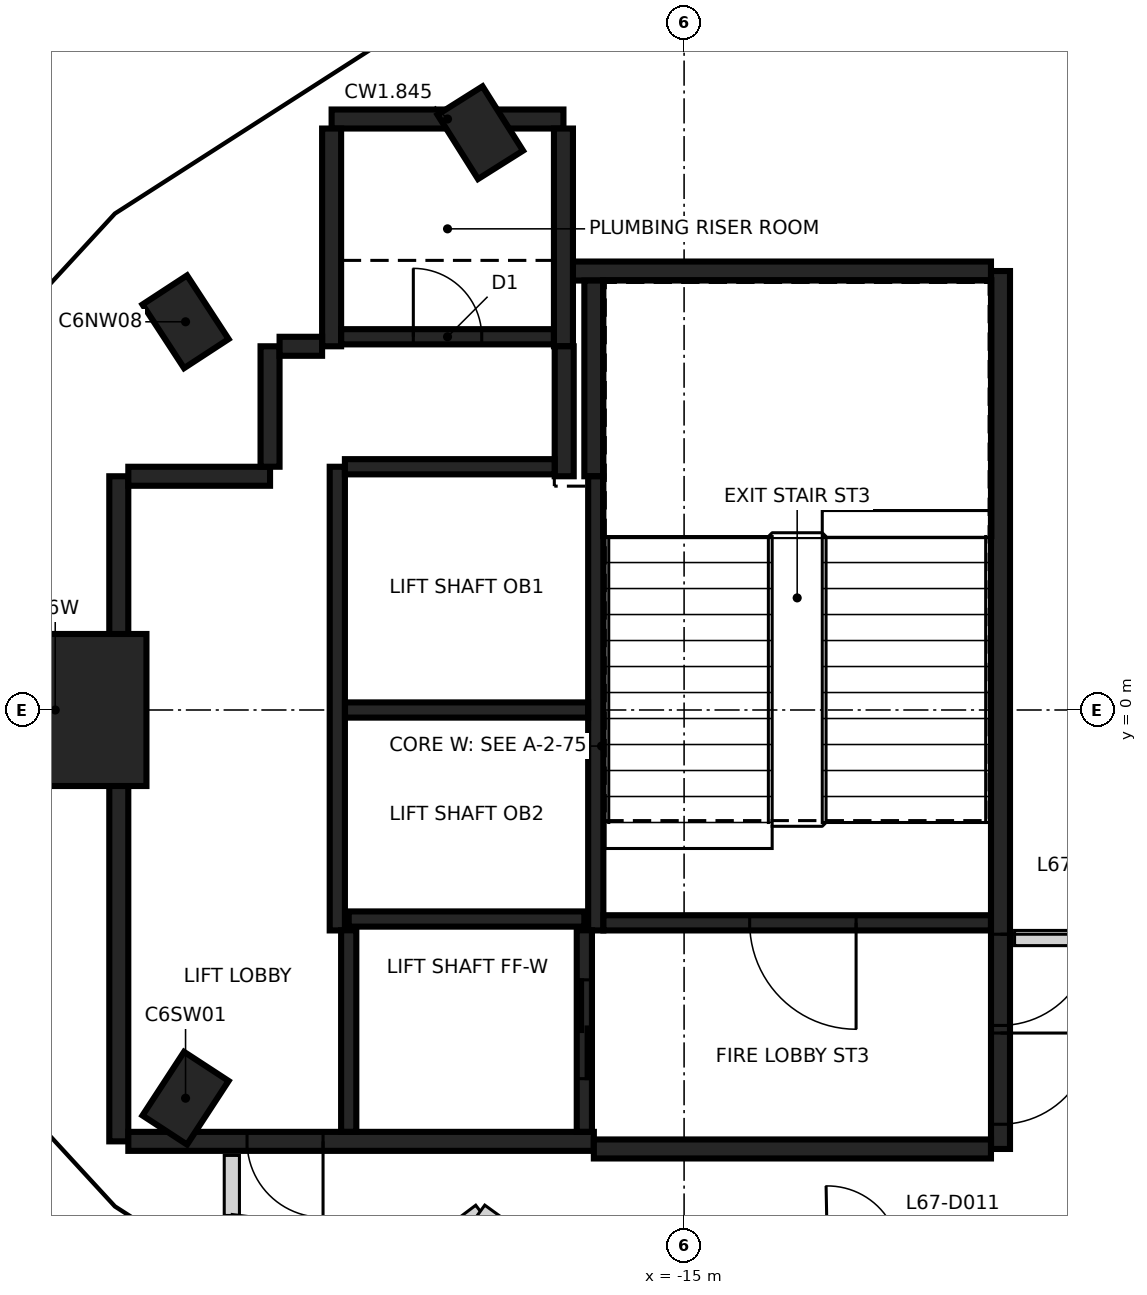
"""IFC4 building model, lengths in metres.
Left out: names, types, materials, properties, quantities, classifications, styles, units other than length and angle.
Written with IfcOpenShell. Run it as: python <this file> out.ifc"""

import sys

from ifc_helpers import new_model, si_unit, direction, frame, frame_2d, origin, origin_2d, place, context, subcontext, project, spatial, rectangle, extrude, element, fill, save


model = new_model("IFC4")
c1 = context("Model", 3, precision=1e-05, world=origin(), true_north=direction((0.0, 1.0)))
c2 = subcontext(c1, "Body", "Model", "MODEL_VIEW")
j1 = project(units=[si_unit("LENGTHUNIT", "METRE"), si_unit("PLANEANGLEUNIT", "RADIAN")], contexts=[c1])
p1 = place(None, origin())
s1 = spatial("IfcSite", under=j1, at=p1, CompositionType="ELEMENT")
p2 = place(p1, origin())
s2 = spatial("IfcBuilding", under=s1, at=p2, CompositionType="ELEMENT")
p3 = place(p2, frame((0.0, 0.0, 265.8)))
s3 = spatial("IfcBuildingStorey", under=s2, at=p3, CompositionType="ELEMENT", Elevation=265.8)
for number, where, z_axis, x_axis in (
    (1, (-17.681, 7.595, -0.35), (0.0, 0.0, 1.0), (-0.533, 0.846, 0.0)),
    (2, (-21.559, 5.107, -0.35), (0.0, 0.0, 1.0), (-0.547, 0.837, 0.0)),
    (3, (-21.559, -5.107, -0.35), (0.0, 0.0, 1.0), (0.547, 0.837, 0.0)),
):
    element("IfcColumn", number, at=place(p3, frame(where, z_axis=z_axis, x_axis=x_axis)), inside=s3, PredefinedType="COLUMN", context=c2, shape_type="SweptSolid", body=[
        extrude(rectangle(XDim=1.0, YDim=0.7, at=origin_2d()), origin(), (0.0, 0.0, 1.0), 3.6),
    ])
p4 = place(p3, frame((-23.273, 0.0, -0.35), z_axis=(0.0, 0.0, 1.0), x_axis=(1.0, 0.0, 0.0)))
e4 = element("IfcColumn", 4, at=p4, inside=s3, PredefinedType="COLUMN", context=c2, shape_type="SweptSolid", body=[
    extrude(rectangle(XDim=2.4, YDim=2.0, at=origin_2d()), origin(), (0.0, 0.0, 1.0), 3.6),
])
p5 = place(p3, frame((-10.837, 5.775, 0.0), z_axis=(0.0, 0.0, 1.0), x_axis=(0.0, -1.0, 0.0)))
e5 = element("IfcWall", 5, at=p5, inside=s3, PredefinedType="SHEAR", context=c2, shape_type="SweptSolid", body=[
    extrude(rectangle(XDim=11.55, YDim=0.25, at=frame_2d((5.775, 0.0))), origin(), (0.0, 0.0, 1.0), 3.25),
])
p6 = place(p5, frame((10.025, 0.0, 0.0)))
e6 = element("IfcOpeningElement", 6, at=p6, cuts=e5, PredefinedType="OPENING", context=c2, shape_type="SweptSolid", body=[
    extrude(rectangle(XDim=1.2, YDim=2.1, at=frame_2d((0.6, 1.05))), frame((0.0, 0.135, 0.0), z_axis=(0.0, -1.0, 0.0), x_axis=(1.0, 0.0, 0.0)), (0.0, 0.0, 1.0), 0.27),
])
p7 = place(p5, frame((8.725, 0.0, 0.0)))
e7 = element("IfcOpeningElement", 7, at=p7, cuts=e5, PredefinedType="OPENING", context=c2, shape_type="SweptSolid", body=[
    extrude(rectangle(XDim=1.2, YDim=2.1, at=frame_2d((0.6, 1.05))), frame((0.0, 0.135, 0.0), z_axis=(0.0, -1.0, 0.0), x_axis=(1.0, 0.0, 0.0)), (0.0, 0.0, 1.0), 0.27),
])
p8 = place(p3, frame((-22.437, -5.675, 0.0), z_axis=(0.0, 0.0, 1.0), x_axis=(0.0, 1.0, 0.0)))
e8 = element("IfcWall", 8, at=p8, inside=s3, PredefinedType="SHEAR", context=c2, shape_type="SweptSolid", body=[
    extrude(rectangle(XDim=8.75, YDim=0.25, at=frame_2d((4.375, 0.0))), origin(), (0.0, 0.0, 1.0), 3.25),
])
p9 = place(p3, frame((-16.187, -5.675, 0.0), z_axis=(0.0, 0.0, 1.0), x_axis=(-1.0, 0.0, 0.0)))
e9 = element("IfcWall", 9, at=p9, inside=s3, PredefinedType="SHEAR", context=c2, shape_type="SweptSolid", body=[
    extrude(rectangle(XDim=6.125, YDim=0.25, at=frame_2d((3.062, 0.0))), origin(), (0.0, 0.0, 1.0), 3.25),
])
p10 = place(p9, frame((3.563, 0.0, 0.0)))
e10 = element("IfcOpeningElement", 10, at=p10, cuts=e9, PredefinedType="OPENING", context=c2, shape_type="SweptSolid", body=[
    extrude(rectangle(XDim=1.0, YDim=2.1, at=frame_2d((0.5, 1.05))), frame((0.0, 0.135, 0.0), z_axis=(0.0, -1.0, 0.0), x_axis=(1.0, 0.0, 0.0)), (0.0, 0.0, 1.0), 0.27),
])
p11 = place(p3, frame((-10.963, -5.775, 0.0), z_axis=(0.0, 0.0, 1.0), x_axis=(-1.0, 0.0, 0.0)))
e11 = element("IfcWall", 11, at=p11, inside=s3, PredefinedType="SHEAR", context=c2, shape_type="SweptSolid", body=[
    extrude(rectangle(XDim=5.225, YDim=0.25, at=frame_2d((2.612, 0.0))), origin(), (0.0, 0.0, 1.0), 3.25),
])
p12 = place(p3, frame((-16.472, 5.775, 0.0), z_axis=(0.0, 0.0, 1.0), x_axis=(1.0, 0.0, 0.0)))
e12 = element("IfcWall", 12, at=p12, inside=s3, PredefinedType="SHEAR", context=c2, shape_type="SweptSolid", body=[
    extrude(rectangle(XDim=5.51, YDim=0.25, at=frame_2d((2.755, 0.0))), origin(), (0.0, 0.0, 1.0), 3.25),
])
p13 = place(p3, frame((-19.637, 7.775, 0.0), z_axis=(0.0, 0.0, 1.0), x_axis=(1.0, 0.0, 0.0)))
e13 = element("IfcWall", 13, at=p13, inside=s3, PredefinedType="SHEAR", context=c2, shape_type="SweptSolid", body=[
    extrude(rectangle(XDim=3.05, YDim=0.25, at=frame_2d((1.525, 0.0))), origin(), (0.0, 0.0, 1.0), 3.25),
])
for number, where, z_axis, x_axis in (
    (14, (-16.587, 7.65, 0.0), (0.0, 0.0, 1.0), (0.0, -1.0, 0.0)),
    (15, (-19.637, 4.785, 0.0), (0.0, 0.0, 1.0), (0.0, 1.0, 0.0)),
):
    element("IfcWall", number, at=place(p3, frame(where, z_axis=z_axis, x_axis=x_axis)), inside=s3, PredefinedType="SHEAR", context=c2, shape_type="SweptSolid", body=[
        extrude(rectangle(XDim=2.865, YDim=0.25, at=frame_2d((1.432, 0.0))), origin(), (0.0, 0.0, 1.0), 3.25),
    ])
p14 = place(p3, frame((-16.187, 3.075, 0.0), z_axis=(0.0, 0.0, 1.0), x_axis=(0.0, 1.0, 0.0)))
e16 = element("IfcWall", 16, at=p14, inside=s3, PredefinedType="SHEAR", context=c2, shape_type="SweptSolid", body=[
    extrude(rectangle(XDim=2.575, YDim=0.25, at=frame_2d((1.287, 0.0))), origin(), (0.0, 0.0, 1.0), 3.25),
])
p15 = place(p3, frame((-22.312, 3.075, 0.0), z_axis=(0.0, 0.0, 1.0), x_axis=(1.0, 0.0, 0.0)))
e17 = element("IfcWall", 17, at=p15, inside=s3, PredefinedType="SHEAR", context=c2, shape_type="SweptSolid", body=[
    extrude(rectangle(XDim=1.865, YDim=0.25, at=frame_2d((0.932, 0.0))), origin(), (0.0, 0.0, 1.0), 3.25),
])
p16 = place(p3, frame((-16.577, 4.785, 0.0), z_axis=(0.0, 0.0, 1.0), x_axis=(0.0, -1.0, 0.0)))
e18 = element("IfcWall", 18, at=p16, inside=s3, PredefinedType="SHEAR", context=c2, shape_type="SweptSolid", body=[
    extrude(rectangle(XDim=1.71, YDim=0.25, at=frame_2d((0.855, 0.0))), origin(), (0.0, 0.0, 1.0), 3.25),
])
p17 = place(p3, frame((-20.447, 3.2, 0.0), z_axis=(0.0, 0.0, 1.0), x_axis=(0.0, 1.0, 0.0)))
e19 = element("IfcWall", 19, at=p17, inside=s3, PredefinedType="SHEAR", context=c2, shape_type="SweptSolid", body=[
    extrude(rectangle(XDim=1.584, YDim=0.25, at=frame_2d((0.792, 0.0))), origin(), (0.0, 0.0, 1.0), 3.25),
])
p18 = place(p3, frame((-20.322, 4.785, 0.0), z_axis=(0.0, 0.0, 1.0), x_axis=(1.0, 0.0, 0.0)))
e20 = element("IfcWall", 20, at=p18, inside=s3, PredefinedType="SHEAR", context=c2, shape_type="SweptSolid", body=[
    extrude(rectangle(XDim=0.559, YDim=0.25, at=frame_2d((0.28, 0.0))), origin(), (0.0, 0.0, 1.0), 3.25),
])
p19 = place(p3, frame((-16.162, 3.074, 0.0), z_axis=(0.0, 0.0, 1.0), x_axis=(0.0, -1.0, 0.0)))
e21 = element("IfcWall", 21, at=p19, inside=s3, PredefinedType="SHEAR", context=c2, shape_type="SweptSolid", body=[
    extrude(rectangle(XDim=5.974, YDim=0.2, at=frame_2d((2.987, 0.0))), origin(), (0.0, 0.0, 1.0), 3.25),
])
p20 = place(p3, frame((-19.562, -2.9, 0.0), z_axis=(0.0, 0.0, 1.0), x_axis=(0.0, 1.0, 0.0)))
e22 = element("IfcWall", 22, at=p20, inside=s3, PredefinedType="SHEAR", context=c2, shape_type="SweptSolid", body=[
    extrude(rectangle(XDim=6.1, YDim=0.2, at=frame_2d((3.05, 0.0))), origin(), (0.0, 0.0, 1.0), 3.25),
])
p21 = place(p3, frame((-10.963, -2.8, 0.0), z_axis=(0.0, 0.0, 1.0), x_axis=(-1.0, 0.0, 0.0)))
e23 = element("IfcWall", 23, at=p21, inside=s3, PredefinedType="SHEAR", context=c2, shape_type="SweptSolid", body=[
    extrude(rectangle(XDim=5.098, YDim=0.2, at=frame_2d((2.549, 0.0))), origin(), (0.0, 0.0, 1.0), 3.25),
])
p22 = place(p21, frame((1.774, 0.0, 0.0)))
e24 = element("IfcOpeningElement", 24, at=p22, cuts=e23, PredefinedType="OPENING", context=c2, shape_type="SweptSolid", body=[
    extrude(rectangle(XDim=1.4, YDim=2.1, at=frame_2d((0.7, 1.05))), frame((0.0, 0.11, 0.0), z_axis=(0.0, -1.0, 0.0), x_axis=(1.0, 0.0, 0.0)), (0.0, 0.0, 1.0), 0.22),
])
p23 = place(p3, frame((-16.263, 0.0, 0.0), z_axis=(0.0, 0.0, 1.0), x_axis=(-1.0, 0.0, 0.0)))
e25 = element("IfcWall", 25, at=p23, inside=s3, PredefinedType="SHEAR", context=c2, shape_type="SweptSolid", body=[
    extrude(rectangle(XDim=3.198, YDim=0.2, at=frame_2d((1.599, 0.0))), origin(), (0.0, 0.0, 1.0), 3.25),
])
p24 = place(p3, frame((-19.511, 4.91, 0.0), z_axis=(0.0, 0.0, 1.0), x_axis=(1.0, 0.0, 0.0)))
e26 = element("IfcWall", 26, at=p24, inside=s3, PredefinedType="SHEAR", context=c2, shape_type="SweptSolid", body=[
    extrude(rectangle(XDim=2.798, YDim=0.2, at=frame_2d((1.399, 0.0))), origin(), (0.0, 0.0, 1.0), 3.25),
])
p25 = place(p24, frame((0.949, 0.0, 0.0)))
e27 = element("IfcOpeningElement", 27, at=p25, cuts=e26, PredefinedType="OPENING", context=c2, shape_type="SweptSolid", body=[
    extrude(rectangle(XDim=0.9, YDim=2.1, at=frame_2d((0.45, 1.05))), frame((0.0, 0.11, 0.0), z_axis=(0.0, -1.0, 0.0), x_axis=(1.0, 0.0, 0.0)), (0.0, 0.0, 1.0), 0.22),
])
p26 = place(p3, frame((-19.462, 3.2, 0.0), z_axis=(0.0, 0.0, 1.0), x_axis=(1.0, 0.0, 0.0)))
e28 = element("IfcWall", 28, at=p26, inside=s3, PredefinedType="SHEAR", context=c2, shape_type="SweptSolid", body=[
    extrude(rectangle(XDim=2.759, YDim=0.2, at=frame_2d((1.379, 0.0))), origin(), (0.0, 0.0, 1.0), 3.25),
])
p27 = place(p3, frame((-19.412, -2.75, 0.0), z_axis=(0.0, 0.0, 1.0), x_axis=(1.0, 0.0, 0.0)))
e29 = element("IfcWall", 29, at=p27, inside=s3, PredefinedType="SHEAR", context=c2, shape_type="SweptSolid", body=[
    extrude(rectangle(XDim=3.1, YDim=0.2, at=frame_2d((1.55, 0.0))), origin(), (0.0, 0.0, 1.0), 3.25),
])
p28 = place(p3, frame((-16.312, -2.898, 0.0), z_axis=(0.0, 0.0, 1.0), x_axis=(0.0, -1.0, 0.0)))
e30 = element("IfcWall", 30, at=p28, inside=s3, PredefinedType="SHEAR", context=c2, shape_type="SweptSolid", body=[
    extrude(rectangle(XDim=2.651, YDim=0.2, at=frame_2d((1.325, 0.0))), origin(), (0.0, 0.0, 1.0), 3.25),
])
p29 = place(p28, frame((0.652, 0.0, 0.0)))
e31 = element("IfcOpeningElement", 31, at=p29, cuts=e30, PredefinedType="OPENING", context=c2, shape_type="SweptSolid", body=[
    extrude(rectangle(XDim=1.3, YDim=2.1, at=frame_2d((0.65, 1.05))), frame((0.0, 0.11, 0.0), z_axis=(0.0, -1.0, 0.0), x_axis=(1.0, 0.0, 0.0)), (0.0, 0.0, 1.0), 0.22),
])
p30 = place(p3, frame((-19.412, -5.549, 0.0), z_axis=(0.0, 0.0, 1.0), x_axis=(0.0, 1.0, 0.0)))
e32 = element("IfcWall", 32, at=p30, inside=s3, PredefinedType="SHEAR", context=c2, shape_type="SweptSolid", body=[
    extrude(rectangle(XDim=2.651, YDim=0.2, at=frame_2d((1.325, 0.0))), origin(), (0.0, 0.0, 1.0), 3.25),
])
p31 = place(p3, frame((-20.95, -6.65, 0.0), z_axis=(0.0, 0.0, 1.0), x_axis=(0.0, 1.0, 0.0)))
e33 = element("IfcWall", 33, at=p31, inside=s3, PredefinedType="PARTITIONING", context=c2, shape_type="SweptSolid", body=[
    extrude(rectangle(XDim=0.79, YDim=0.2, at=frame_2d((0.395, 0.0))), origin(), (0.0, 0.0, 1.0), 3.25),
])
p32 = place(p3, frame((-20.929, -7.306, 0.0), z_axis=(0.0, 0.0, 1.0), x_axis=(0.125534186853, 0.992089294334, 0.0)))
e34 = element("IfcWall", 34, at=p32, inside=s3, PredefinedType="PARTITIONING", context=c2, shape_type="SweptSolid", body=[
    extrude(rectangle(XDim=0.661, YDim=0.2, at=frame_2d((0.331, 0.0))), origin(), (0.0, 0.0, 1.0), 3.25),
])
p33 = place(p3, frame((-18.642, -7.319, 0.0), z_axis=(0.0, 0.0, 1.0), x_axis=(0.798707882989, 0.601718968998, 0.0)))
e35 = element("IfcWall", 35, at=p33, inside=s3, PredefinedType="PARTITIONING", context=c2, shape_type="SweptSolid", body=[
    extrude(rectangle(XDim=1.203, YDim=0.2, at=frame_2d((0.602, 0.0))), origin(), (0.0, 0.0, 1.0), 2.35),
])
p34 = place(p3, frame((-17.681, -6.595, 0.0), z_axis=(0.0, 0.0, 1.0), x_axis=(0.810123213102, -0.586259652026, 0.0)))
e36 = element("IfcWall", 36, at=p34, inside=s3, PredefinedType="PARTITIONING", context=c2, shape_type="SweptSolid", body=[
    extrude(rectangle(XDim=1.17, YDim=0.2, at=frame_2d((0.585, 0.0))), origin(), (0.0, 0.0, 1.0), 3.25),
])
p35 = place(p3, frame((-10.652, -3.0, 0.0), z_axis=(0.0, 0.0, 1.0), x_axis=(1.0, 0.0, 0.0)))
e37 = element("IfcWall", 37, at=p35, inside=s3, PredefinedType="PARTITIONING", context=c2, shape_type="SweptSolid", body=[
    extrude(rectangle(XDim=0.994, YDim=0.2, at=frame_2d((0.497, 0.0))), origin(), (0.0, 0.0, 1.0), 3.25),
])
p36 = place(p3, frame((-10.023, -7.151, 0.0), z_axis=(0.0, 0.0, 1.0), x_axis=(0.668886243279, 0.743364778256, 0.0)))
e38 = element("IfcWall", 38, at=p36, inside=s3, PredefinedType="PARTITIONING", context=c2, shape_type="SweptSolid", body=[
    extrude(rectangle(XDim=3.609, YDim=0.2, at=frame_2d((1.805, 0.0))), origin(), (0.0, 0.0, 1.0), 3.25),
])
p37 = place(p29, origin())
e39 = element("IfcDoor", 39, at=p37, inside=s3, OperationType="SLIDING_TO_RIGHT", PredefinedType="DOOR", context=c2, shape_type="SweptSolid", body=[
    extrude(rectangle(XDim=1.3, YDim=2.1, at=frame_2d((0.65, 1.05))), frame((0.0, 0.025, 0.0), z_axis=(0.0, -1.0, 0.0), x_axis=(1.0, 0.0, 0.0)), (0.0, 0.0, 1.0), 0.05),
])
fill(e31, e39)
p38 = place(p10, origin())
e40 = element("IfcDoor", 40, at=p38, inside=s3, OperationType="SINGLE_SWING_LEFT", PredefinedType="DOOR", context=c2, shape_type="SweptSolid", body=[
    extrude(rectangle(XDim=1.0, YDim=2.1, at=frame_2d((0.5, 1.05))), frame((0.0, 0.025, 0.0), z_axis=(0.0, -1.0, 0.0), x_axis=(1.0, 0.0, 0.0)), (0.0, 0.0, 1.0), 0.05),
])
fill(e10, e40)
p39 = place(p6, origin())
e41 = element("IfcDoor", 41, at=p39, inside=s3, OperationType="SINGLE_SWING_LEFT", PredefinedType="DOOR", context=c2, shape_type="SweptSolid", body=[
    extrude(rectangle(XDim=1.2, YDim=2.1, at=frame_2d((0.6, 1.05))), frame((0.0, 0.025, 0.0), z_axis=(0.0, -1.0, 0.0), x_axis=(1.0, 0.0, 0.0)), (0.0, 0.0, 1.0), 0.05),
])
fill(e6, e41)
p40 = place(p7, origin())
e42 = element("IfcDoor", 42, at=p40, inside=s3, OperationType="SINGLE_SWING_RIGHT", PredefinedType="DOOR", context=c2, shape_type="SweptSolid", body=[
    extrude(rectangle(XDim=1.2, YDim=2.1, at=frame_2d((0.6, 1.05))), frame((0.0, 0.025, 0.0), z_axis=(0.0, -1.0, 0.0), x_axis=(1.0, 0.0, 0.0)), (0.0, 0.0, 1.0), 0.05),
])
fill(e7, e42)
p41 = place(p22, origin())
e43 = element("IfcDoor", 43, at=p41, inside=s3, OperationType="SINGLE_SWING_RIGHT", PredefinedType="DOOR", context=c2, shape_type="SweptSolid", body=[
    extrude(rectangle(XDim=1.4, YDim=2.1, at=frame_2d((0.7, 1.05))), frame((0.0, 0.025, 0.0), z_axis=(0.0, -1.0, 0.0), x_axis=(1.0, 0.0, 0.0)), (0.0, 0.0, 1.0), 0.05),
])
fill(e24, e43)
p42 = place(p25, origin())
e44 = element("IfcDoor", 44, at=p42, inside=s3, OperationType="SINGLE_SWING_LEFT", PredefinedType="DOOR", context=c2, shape_type="SweptSolid", body=[
    extrude(rectangle(XDim=0.9, YDim=2.1, at=frame_2d((0.45, 1.05))), frame((0.0, 0.025, 0.0), z_axis=(0.0, -1.0, 0.0), x_axis=(1.0, 0.0, 0.0)), (0.0, 0.0, 1.0), 0.05),
])
fill(e27, e44)
save(model, sys.argv[1])
